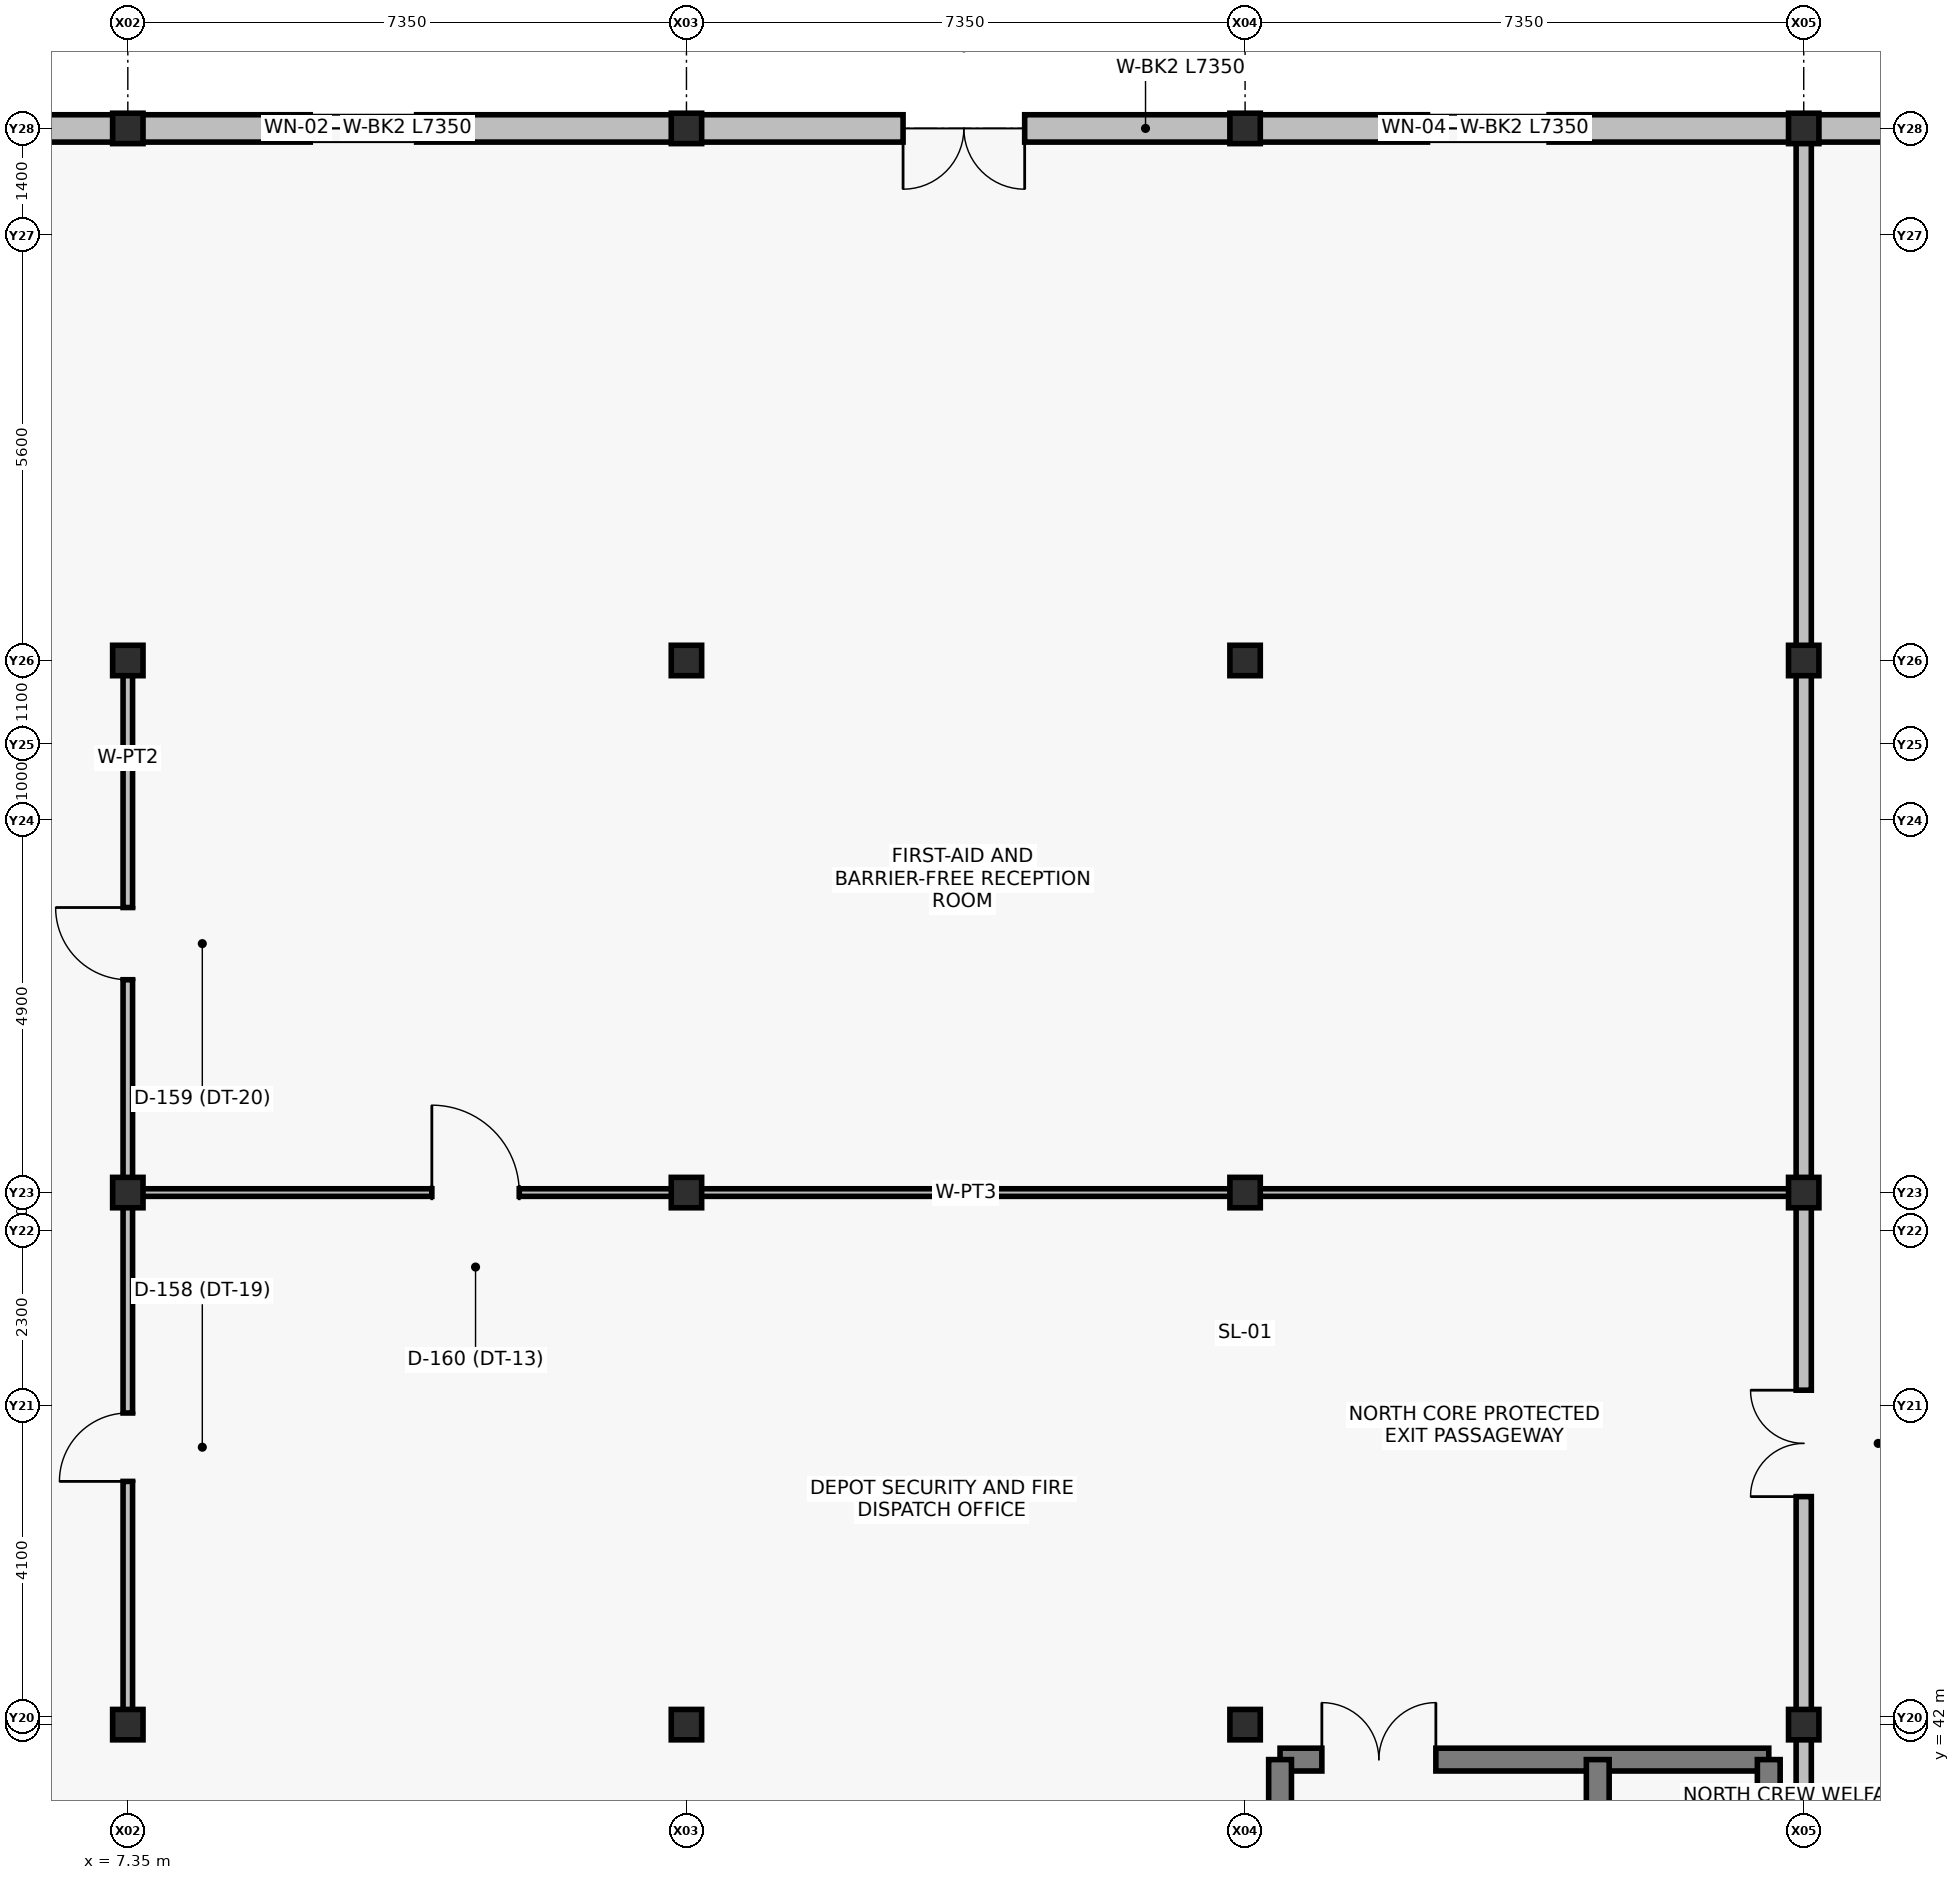
"""IFC4 building model, lengths in metres.
Left out: names, types, materials, properties, quantities, classifications, styles, units other than length and angle.
Written with IfcOpenShell. Run it as: python <this file> out.ifc"""

import sys

from ifc_helpers import new_model, si_unit, direction, frame, frame_2d, origin, origin_2d, place, context, subcontext, project, spatial, rectangle, i_section, extrude, element, fill, save


model = new_model("IFC4")
c1 = context("Model", 3, precision=1e-05, world=origin(), true_north=direction((0.0, 1.0)))
c2 = subcontext(c1, "Body", "Model", "MODEL_VIEW")
j1 = project(units=[si_unit("LENGTHUNIT", "METRE"), si_unit("PLANEANGLEUNIT", "RADIAN")], contexts=[c1])
p1 = place(None, origin())
s1 = spatial("IfcSite", under=j1, at=p1, CompositionType="ELEMENT")
p2 = place(p1, origin())
s2 = spatial("IfcBuilding", under=s1, at=p2, CompositionType="ELEMENT")
p3 = place(p2, origin())
s3 = spatial("IfcBuildingStorey", under=s2, at=p3, CompositionType="ELEMENT", Elevation=0.0)
for number, where, z_axis, x_axis in (
    (1, (7.35, 42.0, -0.35), (0.0, 0.0, 1.0), (1.0, 0.0, 0.0)),
    (2, (7.35, 49.0, -0.35), (0.0, 0.0, 1.0), (1.0, 0.0, 0.0)),
    (3, (7.35, 56.0, -0.35), (0.0, 0.0, 1.0), (1.0, 0.0, 0.0)),
    (4, (7.35, 63.0, -0.35), (0.0, 0.0, 1.0), (1.0, 0.0, 0.0)),
    (5, (14.7, 42.0, -0.35), (0.0, 0.0, 1.0), (1.0, 0.0, 0.0)),
    (6, (14.7, 49.0, -0.35), (0.0, 0.0, 1.0), (1.0, 0.0, 0.0)),
    (7, (14.7, 56.0, -0.35), (0.0, 0.0, 1.0), (1.0, 0.0, 0.0)),
    (8, (14.7, 63.0, -0.35), (0.0, 0.0, 1.0), (1.0, 0.0, 0.0)),
    (9, (22.05, 42.0, -0.35), (0.0, 0.0, 1.0), (1.0, 0.0, 0.0)),
    (10, (22.05, 49.0, -0.35), (0.0, 0.0, 1.0), (1.0, 0.0, 0.0)),
    (11, (22.05, 56.0, -0.35), (0.0, 0.0, 1.0), (1.0, 0.0, 0.0)),
    (12, (22.05, 63.0, -0.35), (0.0, 0.0, 1.0), (1.0, 0.0, 0.0)),
    (13, (29.4, 42.0, -0.35), (0.0, 0.0, 1.0), (1.0, 0.0, 0.0)),
    (14, (29.4, 49.0, -0.35), (0.0, 0.0, 1.0), (1.0, 0.0, 0.0)),
    (15, (29.4, 56.0, -0.35), (0.0, 0.0, 1.0), (1.0, 0.0, 0.0)),
    (16, (29.4, 63.0, -0.35), (0.0, 0.0, 1.0), (1.0, 0.0, 0.0)),
):
    element("IfcColumn", number, at=place(p3, frame(where, z_axis=z_axis, x_axis=x_axis)), inside=s3, PredefinedType="COLUMN", context=c2, shape_type="SweptSolid", body=[
        extrude(i_section(OverallWidth=0.4, OverallDepth=0.4, WebThickness=0.013, FlangeThickness=0.021, at=origin_2d()), origin(), (0.0, 0.0, 1.0), 6.35),
    ])
p4 = place(p3, frame((0.0, 63.0, 0.0), z_axis=(0.0, 0.0, 1.0), x_axis=(1.0, 0.0, 0.0)))
e17 = element("IfcWall", 17, at=p4, inside=s3, PredefinedType="SOLIDWALL", context=c2, shape_type="SweptSolid", body=[
    extrude(rectangle(XDim=7.35, YDim=0.36, at=frame_2d((3.675, 0.0))), origin(), (0.0, 0.0, 1.0), 5.15),
])
p5 = place(p4, frame((2.4, 0.0, 0.95)))
e18 = element("IfcOpeningElement", 18, at=p5, cuts=e17, PredefinedType="OPENING", context=c2, shape_type="SweptSolid", body=[
    extrude(rectangle(XDim=1.2, YDim=1.5, at=frame_2d((0.6, 0.75))), frame((0.0, 0.19, 0.0), z_axis=(0.0, -1.0, 0.0), x_axis=(1.0, 0.0, 0.0)), (0.0, 0.0, 1.0), 0.38),
])
p6 = place(p3, frame((7.35, 63.0, 0.0), z_axis=(0.0, 0.0, 1.0), x_axis=(1.0, 0.0, 0.0)))
e19 = element("IfcWall", 19, at=p6, inside=s3, PredefinedType="SOLIDWALL", context=c2, shape_type="SweptSolid", body=[
    extrude(rectangle(XDim=7.35, YDim=0.36, at=frame_2d((3.675, 0.0))), origin(), (0.0, 0.0, 1.0), 5.15),
])
p7 = place(p6, frame((2.4, 0.0, 0.95)))
e20 = element("IfcOpeningElement", 20, at=p7, cuts=e19, PredefinedType="OPENING", context=c2, shape_type="SweptSolid", body=[
    extrude(rectangle(XDim=1.4, YDim=1.6, at=frame_2d((0.7, 0.8))), frame((0.0, 0.19, 0.0), z_axis=(0.0, -1.0, 0.0), x_axis=(1.0, 0.0, 0.0)), (0.0, 0.0, 1.0), 0.38),
])
p8 = place(p3, frame((14.7, 63.0, 0.0), z_axis=(0.0, 0.0, 1.0), x_axis=(1.0, 0.0, 0.0)))
e21 = element("IfcWall", 21, at=p8, inside=s3, PredefinedType="SOLIDWALL", context=c2, shape_type="SweptSolid", body=[
    extrude(rectangle(XDim=7.35, YDim=0.36, at=frame_2d((3.675, 0.0))), origin(), (0.0, 0.0, 1.0), 5.15),
])
p9 = place(p8, frame((2.85, 0.0, 0.0)))
e22 = element("IfcOpeningElement", 22, at=p9, cuts=e21, PredefinedType="OPENING", context=c2, shape_type="SweptSolid", body=[
    extrude(rectangle(XDim=1.6, YDim=2.3, at=frame_2d((0.8, 1.15))), frame((0.0, 0.19, 0.0), z_axis=(0.0, -1.0, 0.0), x_axis=(1.0, 0.0, 0.0)), (0.0, 0.0, 1.0), 0.38),
])
p10 = place(p3, frame((22.05, 63.0, 0.0), z_axis=(0.0, 0.0, 1.0), x_axis=(1.0, 0.0, 0.0)))
e23 = element("IfcWall", 23, at=p10, inside=s3, PredefinedType="SOLIDWALL", context=c2, shape_type="SweptSolid", body=[
    extrude(rectangle(XDim=7.35, YDim=0.36, at=frame_2d((3.675, 0.0))), origin(), (0.0, 0.0, 1.0), 5.15),
])
p11 = place(p10, frame((2.4, 0.0, 0.95)))
e24 = element("IfcOpeningElement", 24, at=p11, cuts=e23, PredefinedType="OPENING", context=c2, shape_type="SweptSolid", body=[
    extrude(rectangle(XDim=1.6, YDim=1.8, at=frame_2d((0.8, 0.9))), frame((0.0, 0.19, 0.0), z_axis=(0.0, -1.0, 0.0), x_axis=(1.0, 0.0, 0.0)), (0.0, 0.0, 1.0), 0.38),
])
p12 = place(p3, frame((29.4, 63.0, 0.0), z_axis=(0.0, 0.0, 1.0), x_axis=(1.0, 0.0, 0.0)))
e25 = element("IfcWall", 25, at=p12, inside=s3, PredefinedType="SOLIDWALL", context=c2, shape_type="SweptSolid", body=[
    extrude(rectangle(XDim=7.35, YDim=0.36, at=frame_2d((3.675, 0.0))), origin(), (0.0, 0.0, 1.0), 5.15),
])
p13 = place(p12, frame((2.85, 0.0, 0.0)))
e26 = element("IfcOpeningElement", 26, at=p13, cuts=e25, PredefinedType="OPENING", context=c2, shape_type="SweptSolid", body=[
    extrude(rectangle(XDim=1.6, YDim=2.3, at=frame_2d((0.8, 1.15))), frame((0.0, 0.19, 0.0), z_axis=(0.0, -1.0, 0.0), x_axis=(1.0, 0.0, 0.0)), (0.0, 0.0, 1.0), 0.38),
])
p14 = place(p3, frame((22.51, 41.54, -0.35), z_axis=(0.0, 0.0, 1.0), x_axis=(1.0, 0.0, 0.0)))
e27 = element("IfcWall", 27, at=p14, inside=s3, PredefinedType="SHEAR", context=c2, shape_type="SweptSolid", body=[
    extrude(rectangle(XDim=6.43, YDim=0.3, at=frame_2d((3.215, 0.0))), origin(), (0.0, 0.0, 1.0), 6.07),
])
p15 = place(p14, frame((0.55, 0.0, 0.35)))
e28 = element("IfcOpeningElement", 28, at=p15, cuts=e27, PredefinedType="OPENING", context=c2, shape_type="SweptSolid", body=[
    extrude(rectangle(XDim=1.5, YDim=2.2, at=frame_2d((0.75, 1.1))), frame((0.0, 0.16, 0.0), z_axis=(0.0, -1.0, 0.0), x_axis=(1.0, 0.0, 0.0)), (0.0, 0.0, 1.0), 0.32),
])
for number, where, z_axis, x_axis in (
    (29, (22.51, 35.46, -0.35), (0.0, 0.0, 1.0), (0.0, 1.0, 0.0)),
    (30, (28.94, 35.46, -0.35), (0.0, 0.0, 1.0), (0.0, 1.0, 0.0)),
):
    element("IfcWall", number, at=place(p3, frame(where, z_axis=z_axis, x_axis=x_axis)), inside=s3, PredefinedType="SHEAR", context=c2, shape_type="SweptSolid", body=[
        extrude(rectangle(XDim=6.08, YDim=0.3, at=frame_2d((3.04, 0.0))), origin(), (0.0, 0.0, 1.0), 6.07),
    ])
p16 = place(p3, frame((26.69, 38.85, -0.35), z_axis=(0.0, 0.0, 1.0), x_axis=(0.0, 1.0, 0.0)))
e31 = element("IfcWall", 31, at=p16, inside=s3, PredefinedType="SHEAR", context=c2, shape_type="SweptSolid", body=[
    extrude(rectangle(XDim=2.69, YDim=0.3, at=frame_2d((1.345, 0.0))), origin(), (0.0, 0.0, 1.0), 6.07),
])
p17 = place(p16, frame((0.4, 0.0, 0.35)))
e32 = element("IfcOpeningElement", 32, at=p17, cuts=e31, PredefinedType="OPENING", context=c2, shape_type="SweptSolid", body=[
    extrude(rectangle(XDim=1.1, YDim=2.15, at=frame_2d((0.55, 1.075))), frame((0.0, 0.16, 0.0), z_axis=(0.0, -1.0, 0.0), x_axis=(1.0, 0.0, 0.0)), (0.0, 0.0, 1.0), 0.32),
])
p18 = place(p3, frame((29.4, 14.0, 0.0), z_axis=(0.0, 0.0, 1.0), x_axis=(0.0, 1.0, 0.0)))
e33 = element("IfcWall", 33, at=p18, inside=s3, PredefinedType="PARTITIONING", context=c2, shape_type="SweptSolid", body=[
    extrude(rectangle(XDim=49.0, YDim=0.2, at=frame_2d((24.5, 0.0))), origin(), (0.0, 0.0, 1.0), 4.35),
])
p19 = place(p18, frame((8.0, 0.0, 0.0)))
e34 = element("IfcOpeningElement", 34, at=p19, cuts=e33, PredefinedType="OPENING", context=c2, shape_type="SweptSolid", body=[
    extrude(rectangle(XDim=1.35, YDim=2.2, at=frame_2d((0.675, 1.1))), frame((0.0, 0.11, 0.0), z_axis=(0.0, -1.0, 0.0), x_axis=(1.0, 0.0, 0.0)), (0.0, 0.0, 1.0), 0.22),
])
p20 = place(p18, frame((17.2, 0.0, 0.0)))
e35 = element("IfcOpeningElement", 35, at=p20, cuts=e33, PredefinedType="OPENING", context=c2, shape_type="SweptSolid", body=[
    extrude(rectangle(XDim=1.4, YDim=2.2, at=frame_2d((0.7, 1.1))), frame((0.0, 0.11, 0.0), z_axis=(0.0, -1.0, 0.0), x_axis=(1.0, 0.0, 0.0)), (0.0, 0.0, 1.0), 0.22),
])
p21 = place(p18, frame((31.0, 0.0, 0.0)))
e36 = element("IfcOpeningElement", 36, at=p21, cuts=e33, PredefinedType="OPENING", context=c2, shape_type="SweptSolid", body=[
    extrude(rectangle(XDim=1.4, YDim=2.2, at=frame_2d((0.7, 1.1))), frame((0.0, 0.11, 0.0), z_axis=(0.0, -1.0, 0.0), x_axis=(1.0, 0.0, 0.0)), (0.0, 0.0, 1.0), 0.22),
])
p22 = place(p3, frame((7.35, 42.0, 0.0), z_axis=(0.0, 0.0, 1.0), x_axis=(0.0, 1.0, 0.0)))
e37 = element("IfcWall", 37, at=p22, inside=s3, PredefinedType="PARTITIONING", context=c2, shape_type="SweptSolid", body=[
    extrude(rectangle(XDim=14.0, YDim=0.125, at=frame_2d((7.0, 0.0))), origin(), (0.0, 0.0, 1.0), 4.35),
])
p23 = place(p22, frame((3.2, 0.0, 0.0)))
e38 = element("IfcOpeningElement", 38, at=p23, cuts=e37, PredefinedType="OPENING", context=c2, shape_type="SweptSolid", body=[
    extrude(rectangle(XDim=0.9, YDim=2.1, at=frame_2d((0.45, 1.05))), frame((0.0, 0.072, 0.0), z_axis=(0.0, -1.0, 0.0), x_axis=(1.0, 0.0, 0.0)), (0.0, 0.0, 1.0), 0.145),
])
p24 = place(p22, frame((9.8, 0.0, 0.0)))
e39 = element("IfcOpeningElement", 39, at=p24, cuts=e37, PredefinedType="OPENING", context=c2, shape_type="SweptSolid", body=[
    extrude(rectangle(XDim=0.95, YDim=2.2, at=frame_2d((0.475, 1.1))), frame((0.0, 0.072, 0.0), z_axis=(0.0, -1.0, 0.0), x_axis=(1.0, 0.0, 0.0)), (0.0, 0.0, 1.0), 0.145),
])
p25 = place(p3, frame((7.35, 49.0, 0.0), z_axis=(0.0, 0.0, 1.0), x_axis=(1.0, 0.0, 0.0)))
e40 = element("IfcWall", 40, at=p25, inside=s3, PredefinedType="PARTITIONING", context=c2, shape_type="SweptSolid", body=[
    extrude(rectangle(XDim=22.05, YDim=0.1, at=frame_2d((11.025, 0.0))), origin(), (0.0, 0.0, 1.0), 4.35),
])
p26 = place(p25, frame((4.0, 0.0, 0.0)))
e41 = element("IfcOpeningElement", 41, at=p26, cuts=e40, PredefinedType="OPENING", context=c2, shape_type="SweptSolid", body=[
    extrude(rectangle(XDim=1.15, YDim=2.15, at=frame_2d((0.575, 1.075))), frame((0.0, 0.06, 0.0), z_axis=(0.0, -1.0, 0.0), x_axis=(1.0, 0.0, 0.0)), (0.0, 0.0, 1.0), 0.12),
])
p27 = place(p7, origin())
e42 = element("IfcWindow", 42, at=p27, inside=s3, PartitioningType="SINGLE_PANEL", PredefinedType="WINDOW", context=c2, shape_type="SweptSolid", body=[
    extrude(rectangle(XDim=1.4, YDim=1.6, at=frame_2d((0.7, 0.8))), frame((0.0, 0.03, 0.0), z_axis=(0.0, -1.0, 0.0), x_axis=(1.0, 0.0, 0.0)), (0.0, 0.0, 1.0), 0.06),
])
fill(e20, e42)
p28 = place(p9, origin())
e43 = element("IfcDoor", 43, at=p28, inside=s3, OperationType="DOUBLE_DOOR_SINGLE_SWING", PredefinedType="DOOR", context=c2, shape_type="SweptSolid", body=[
    extrude(rectangle(XDim=1.6, YDim=2.3, at=frame_2d((0.8, 1.15))), frame((0.0, 0.025, 0.0), z_axis=(0.0, -1.0, 0.0), x_axis=(1.0, 0.0, 0.0)), (0.0, 0.0, 1.0), 0.05),
])
fill(e22, e43)
p29 = place(p11, origin())
e44 = element("IfcWindow", 44, at=p29, inside=s3, PartitioningType="SINGLE_PANEL", PredefinedType="WINDOW", context=c2, shape_type="SweptSolid", body=[
    extrude(rectangle(XDim=1.6, YDim=1.8, at=frame_2d((0.8, 0.9))), frame((0.0, 0.03, 0.0), z_axis=(0.0, -1.0, 0.0), x_axis=(1.0, 0.0, 0.0)), (0.0, 0.0, 1.0), 0.06),
])
fill(e24, e44)
p30 = place(p15, origin())
e45 = element("IfcDoor", 45, at=p30, inside=s3, OperationType="DOUBLE_DOOR_SINGLE_SWING", PredefinedType="DOOR", context=c2, shape_type="SweptSolid", body=[
    extrude(rectangle(XDim=1.5, YDim=2.2, at=frame_2d((0.75, 1.1))), frame((0.0, 0.025, 0.0), z_axis=(0.0, -1.0, 0.0), x_axis=(1.0, 0.0, 0.0)), (0.0, 0.0, 1.0), 0.05),
])
fill(e28, e45)
p31 = place(p21, origin())
e46 = element("IfcDoor", 46, at=p31, inside=s3, OperationType="DOUBLE_DOOR_SINGLE_SWING", PredefinedType="DOOR", context=c2, shape_type="SweptSolid", body=[
    extrude(rectangle(XDim=1.4, YDim=2.2, at=frame_2d((0.7, 1.1))), frame((0.0, 0.025, 0.0), z_axis=(0.0, -1.0, 0.0), x_axis=(1.0, 0.0, 0.0)), (0.0, 0.0, 1.0), 0.05),
])
fill(e36, e46)
p32 = place(p23, origin())
e47 = element("IfcDoor", 47, at=p32, inside=s3, OperationType="SINGLE_SWING_LEFT", PredefinedType="DOOR", context=c2, shape_type="SweptSolid", body=[
    extrude(rectangle(XDim=0.9, YDim=2.1, at=frame_2d((0.45, 1.05))), frame((0.0, 0.025, 0.0), z_axis=(0.0, -1.0, 0.0), x_axis=(1.0, 0.0, 0.0)), (0.0, 0.0, 1.0), 0.05),
])
fill(e38, e47)
p33 = place(p24, origin())
e48 = element("IfcDoor", 48, at=p33, inside=s3, OperationType="SINGLE_SWING_RIGHT", PredefinedType="DOOR", context=c2, shape_type="SweptSolid", body=[
    extrude(rectangle(XDim=0.95, YDim=2.2, at=frame_2d((0.475, 1.1))), frame((0.0, 0.025, 0.0), z_axis=(0.0, -1.0, 0.0), x_axis=(1.0, 0.0, 0.0)), (0.0, 0.0, 1.0), 0.05),
])
fill(e39, e48)
p34 = place(p26, origin())
e49 = element("IfcDoor", 49, at=p34, inside=s3, OperationType="SINGLE_SWING_LEFT", PredefinedType="DOOR", context=c2, shape_type="SweptSolid", body=[
    extrude(rectangle(XDim=1.15, YDim=2.15, at=frame_2d((0.575, 1.075))), frame((0.0, 0.025, 0.0), z_axis=(0.0, -1.0, 0.0), x_axis=(1.0, 0.0, 0.0)), (0.0, 0.0, 1.0), 0.05),
])
fill(e41, e49)
save(model, sys.argv[1])
